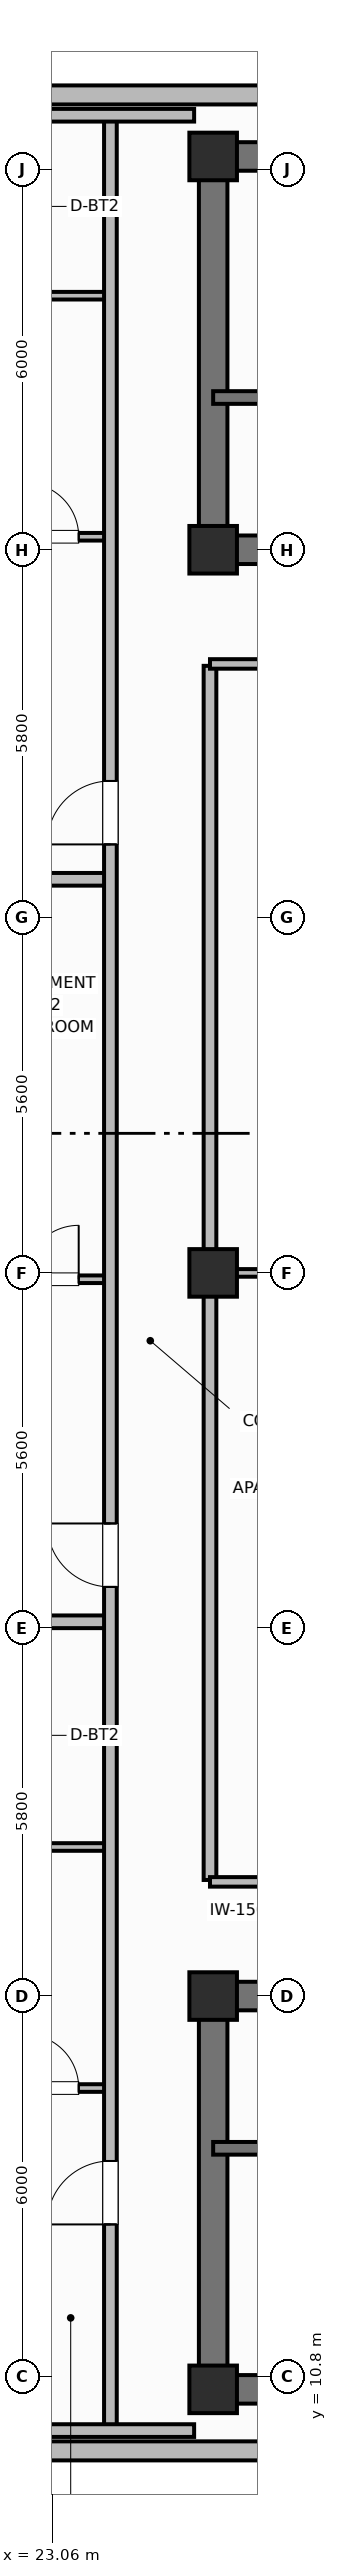
"""IFC4 building model, lengths in metres.
Left out: names, types, materials, properties, quantities, classifications, styles, units other than length and angle.
Written with IfcOpenShell. Run it as: python <this file> out.ifc"""

import sys

from ifc_helpers import new_model, si_unit, direction, frame, frame_2d, origin, origin_2d, place, context, subcontext, project, spatial, rectangle, extrude, element, fill, save


model = new_model("IFC4")
c1 = context("Model", 3, precision=1e-05, world=origin(), true_north=direction((0.0, 1.0)))
c2 = subcontext(c1, "Body", "Model", "MODEL_VIEW")
j1 = project(units=[si_unit("LENGTHUNIT", "METRE"), si_unit("PLANEANGLEUNIT", "RADIAN")], contexts=[c1])
p1 = place(None, origin())
s1 = spatial("IfcSite", under=j1, at=p1, CompositionType="ELEMENT")
p2 = place(p1, origin())
s2 = spatial("IfcBuilding", under=s1, at=p2, CompositionType="ELEMENT")
p3 = place(p2, frame((0.0, 0.0, 286.1)))
s3 = spatial("IfcBuildingStorey", under=s2, at=p3, CompositionType="ELEMENT", Elevation=286.1)
p4 = place(p3, frame((52.8, 10.6, 0.0), z_axis=(0.0, 0.0, 1.0), x_axis=(-1.0, 0.0, 0.0)))
e1 = element("IfcWall", 1, at=p4, inside=s3, PredefinedType="SHEAR", context=c2, shape_type="SweptSolid", body=[
    extrude(rectangle(XDim=27.2, YDim=0.45, at=frame_2d((13.6, 0.0))), origin(), (0.0, 0.0, 1.0), 3.7),
])
p5 = place(p3, frame((25.6, 10.825, 0.0), z_axis=(0.0, 0.0, 1.0), x_axis=(0.0, 1.0, 0.0)))
e2 = element("IfcWall", 2, at=p5, inside=s3, PredefinedType="SHEAR", context=c2, shape_type="SweptSolid", body=[
    extrude(rectangle(XDim=5.75, YDim=0.45, at=frame_2d((2.875, 0.0))), origin(), (0.0, 0.0, 1.0), 3.7),
])
p6 = place(p3, frame((25.6, 16.8, 0.0), z_axis=(0.0, 0.0, 1.0), x_axis=(1.0, 0.0, 0.0)))
e3 = element("IfcWall", 3, at=p6, inside=s3, PredefinedType="SHEAR", context=c2, shape_type="SweptSolid", body=[
    extrude(rectangle(XDim=27.2, YDim=0.45, at=frame_2d((13.6, 0.0))), origin(), (0.0, 0.0, 1.0), 3.7),
])
p7 = place(p6, frame((1.9, 0.0, 0.0)))
e4 = element("IfcOpeningElement", 4, at=p7, cuts=e3, PredefinedType="OPENING", context=c2, shape_type="SweptSolid", body=[
    extrude(rectangle(XDim=1.1, YDim=2.15, at=frame_2d((0.55, 1.075))), frame((0.0, 0.235, 0.0), z_axis=(0.0, -1.0, 0.0), x_axis=(1.0, 0.0, 0.0)), (0.0, 0.0, 1.0), 0.47),
])
p8 = place(p6, frame((13.0, 0.0, 0.0)))
e5 = element("IfcOpeningElement", 5, at=p8, cuts=e3, PredefinedType="OPENING", context=c2, shape_type="SweptSolid", body=[
    extrude(rectangle(XDim=1.2, YDim=2.15, at=frame_2d((0.6, 1.075))), frame((0.0, 0.235, 0.0), z_axis=(0.0, -1.0, 0.0), x_axis=(1.0, 0.0, 0.0)), (0.0, 0.0, 1.0), 0.47),
])
p9 = place(p6, frame((21.6, 0.0, 0.0)))
e6 = element("IfcOpeningElement", 6, at=p9, cuts=e3, PredefinedType="OPENING", context=c2, shape_type="SweptSolid", body=[
    extrude(rectangle(XDim=1.0, YDim=2.15, at=frame_2d((0.5, 1.075))), frame((0.0, 0.235, 0.0), z_axis=(0.0, -1.0, 0.0), x_axis=(1.0, 0.0, 0.0)), (0.0, 0.0, 1.0), 0.47),
])
p10 = place(p3, frame((25.6, 45.8, 0.0), z_axis=(0.0, 0.0, 1.0), x_axis=(1.0, 0.0, 0.0)))
e7 = element("IfcWall", 7, at=p10, inside=s3, PredefinedType="SHEAR", context=c2, shape_type="SweptSolid", body=[
    extrude(rectangle(XDim=27.2, YDim=0.45, at=frame_2d((13.6, 0.0))), origin(), (0.0, 0.0, 1.0), 3.7),
])
p11 = place(p3, frame((25.6, 39.825, 0.0), z_axis=(0.0, 0.0, 1.0), x_axis=(0.0, 1.0, 0.0)))
e8 = element("IfcWall", 8, at=p11, inside=s3, PredefinedType="SHEAR", context=c2, shape_type="SweptSolid", body=[
    extrude(rectangle(XDim=5.75, YDim=0.45, at=frame_2d((2.875, 0.0))), origin(), (0.0, 0.0, 1.0), 3.7),
])
p12 = place(p3, frame((52.8, 39.6, 0.0), z_axis=(0.0, 0.0, 1.0), x_axis=(-1.0, 0.0, 0.0)))
e9 = element("IfcWall", 9, at=p12, inside=s3, PredefinedType="SHEAR", context=c2, shape_type="SweptSolid", body=[
    extrude(rectangle(XDim=27.2, YDim=0.45, at=frame_2d((13.6, 0.0))), origin(), (0.0, 0.0, 1.0), 3.7),
])
p13 = place(p12, frame((24.2, 0.0, 0.0)))
e10 = element("IfcOpeningElement", 10, at=p13, cuts=e9, PredefinedType="OPENING", context=c2, shape_type="SweptSolid", body=[
    extrude(rectangle(XDim=1.1, YDim=2.15, at=frame_2d((0.55, 1.075))), frame((0.0, 0.235, 0.0), z_axis=(0.0, -1.0, 0.0), x_axis=(1.0, 0.0, 0.0)), (0.0, 0.0, 1.0), 0.47),
])
p14 = place(p12, frame((15.1, 0.0, 0.0)))
e11 = element("IfcOpeningElement", 11, at=p14, cuts=e9, PredefinedType="OPENING", context=c2, shape_type="SweptSolid", body=[
    extrude(rectangle(XDim=1.2, YDim=2.15, at=frame_2d((0.6, 1.075))), frame((0.0, 0.235, 0.0), z_axis=(0.0, -1.0, 0.0), x_axis=(1.0, 0.0, 0.0)), (0.0, 0.0, 1.0), 0.47),
])
p15 = place(p12, frame((11.6, 0.0, 0.0)))
e12 = element("IfcOpeningElement", 12, at=p15, cuts=e9, PredefinedType="OPENING", context=c2, shape_type="SweptSolid", body=[
    extrude(rectangle(XDim=0.9, YDim=2.1, at=frame_2d((0.45, 1.05))), frame((0.0, 0.235, 0.0), z_axis=(0.0, -1.0, 0.0), x_axis=(1.0, 0.0, 0.0)), (0.0, 0.0, 1.0), 0.47),
])
p16 = place(p12, frame((7.35, 0.0, 0.0)))
e13 = element("IfcOpeningElement", 13, at=p16, cuts=e9, PredefinedType="OPENING", context=c2, shape_type="SweptSolid", body=[
    extrude(rectangle(XDim=0.85, YDim=2.1, at=frame_2d((0.425, 1.05))), frame((0.0, 0.235, 0.0), z_axis=(0.0, -1.0, 0.0), x_axis=(1.0, 0.0, 0.0)), (0.0, 0.0, 1.0), 0.47),
])
p17 = place(p12, frame((4.2, 0.0, 0.0)))
e14 = element("IfcOpeningElement", 14, at=p17, cuts=e9, PredefinedType="OPENING", context=c2, shape_type="SweptSolid", body=[
    extrude(rectangle(XDim=1.3, YDim=2.2, at=frame_2d((0.65, 1.1))), frame((0.0, 0.235, 0.0), z_axis=(0.0, -1.0, 0.0), x_axis=(1.0, 0.0, 0.0)), (0.0, 0.0, 1.0), 0.47),
])
for number, where, z_axis, x_axis in (
    (15, (25.6, 10.6, 0.0), (0.0, 0.0, 1.0), (1.0, 0.0, 0.0)),
    (16, (25.6, 16.8, 0.0), (0.0, 0.0, 1.0), (1.0, 0.0, 0.0)),
    (17, (25.6, 39.6, 0.0), (0.0, 0.0, 1.0), (1.0, 0.0, 0.0)),
    (18, (25.6, 45.8, 0.0), (0.0, 0.0, 1.0), (1.0, 0.0, 0.0)),
    (19, (25.6, 28.2, 0.0), (0.0, 0.0, 1.0), (1.0, 0.0, 0.0)),
):
    element("IfcColumn", number, at=place(p3, frame(where, z_axis=z_axis, x_axis=x_axis)), inside=s3, PredefinedType="COLUMN", context=c2, shape_type="SweptSolid", body=[
        extrude(rectangle(XDim=0.75, YDim=0.75, at=origin_2d()), origin(), (0.0, 0.0, 1.0), 3.7),
    ])
p18 = place(p3, frame((22.56, 9.63, 0.0), z_axis=(0.0, 0.0, 1.0), x_axis=(1.0, 0.0, 0.0)))
e20 = element("IfcWall", 20, at=p18, inside=s3, PredefinedType="SOLIDWALL", context=c2, shape_type="SweptSolid", body=[
    extrude(rectangle(XDim=33.28, YDim=0.3, at=frame_2d((16.64, 0.0))), origin(), (0.0, 0.0, 1.0), 2.73),
])
p19 = place(p18, frame((4.747, 0.0, 0.76)))
e21 = element("IfcOpeningElement", 21, at=p19, cuts=e20, PredefinedType="OPENING", context=c2, shape_type="SweptSolid", body=[
    extrude(rectangle(XDim=1.4, YDim=1.85, at=frame_2d((0.7, 0.925))), frame((0.0, 0.16, 0.0), z_axis=(0.0, -1.0, 0.0), x_axis=(1.0, 0.0, 0.0)), (0.0, 0.0, 1.0), 0.32),
])
p20 = place(p18, frame((7.945, 0.0, 0.76)))
e22 = element("IfcOpeningElement", 22, at=p20, cuts=e20, PredefinedType="OPENING", context=c2, shape_type="SweptSolid", body=[
    extrude(rectangle(XDim=1.4, YDim=1.85, at=frame_2d((0.7, 0.925))), frame((0.0, 0.16, 0.0), z_axis=(0.0, -1.0, 0.0), x_axis=(1.0, 0.0, 0.0)), (0.0, 0.0, 1.0), 0.32),
])
p21 = place(p18, frame((14.341, 0.0, 0.76)))
e23 = element("IfcOpeningElement", 23, at=p21, cuts=e20, PredefinedType="OPENING", context=c2, shape_type="SweptSolid", body=[
    extrude(rectangle(XDim=1.4, YDim=1.85, at=frame_2d((0.7, 0.925))), frame((0.0, 0.16, 0.0), z_axis=(0.0, -1.0, 0.0), x_axis=(1.0, 0.0, 0.0)), (0.0, 0.0, 1.0), 0.32),
])
p22 = place(p18, frame((17.539, 0.0, 0.76)))
e24 = element("IfcOpeningElement", 24, at=p22, cuts=e20, PredefinedType="OPENING", context=c2, shape_type="SweptSolid", body=[
    extrude(rectangle(XDim=1.4, YDim=1.85, at=frame_2d((0.7, 0.925))), frame((0.0, 0.16, 0.0), z_axis=(0.0, -1.0, 0.0), x_axis=(1.0, 0.0, 0.0)), (0.0, 0.0, 1.0), 0.32),
])
p23 = place(p18, frame((23.935, 0.0, 0.76)))
e25 = element("IfcOpeningElement", 25, at=p23, cuts=e20, PredefinedType="OPENING", context=c2, shape_type="SweptSolid", body=[
    extrude(rectangle(XDim=1.4, YDim=1.85, at=frame_2d((0.7, 0.925))), frame((0.0, 0.16, 0.0), z_axis=(0.0, -1.0, 0.0), x_axis=(1.0, 0.0, 0.0)), (0.0, 0.0, 1.0), 0.32),
])
p24 = place(p18, frame((27.133, 0.0, 0.76)))
e26 = element("IfcOpeningElement", 26, at=p24, cuts=e20, PredefinedType="OPENING", context=c2, shape_type="SweptSolid", body=[
    extrude(rectangle(XDim=1.4, YDim=1.85, at=frame_2d((0.7, 0.925))), frame((0.0, 0.16, 0.0), z_axis=(0.0, -1.0, 0.0), x_axis=(1.0, 0.0, 0.0)), (0.0, 0.0, 1.0), 0.32),
])
p25 = place(p3, frame((55.84, 46.77, 0.0), z_axis=(0.0, 0.0, 1.0), x_axis=(-1.0, 0.0, 0.0)))
e27 = element("IfcWall", 27, at=p25, inside=s3, PredefinedType="SOLIDWALL", context=c2, shape_type="SweptSolid", body=[
    extrude(rectangle(XDim=33.28, YDim=0.3, at=frame_2d((16.64, 0.0))), origin(), (0.0, 0.0, 1.0), 2.73),
])
p26 = place(p25, frame((5.08, 0.0, 0.76)))
e28 = element("IfcOpeningElement", 28, at=p26, cuts=e27, PredefinedType="OPENING", context=c2, shape_type="SweptSolid", body=[
    extrude(rectangle(XDim=1.8, YDim=1.85, at=frame_2d((0.9, 0.925))), frame((0.0, 0.16, 0.0), z_axis=(0.0, -1.0, 0.0), x_axis=(1.0, 0.0, 0.0)), (0.0, 0.0, 1.0), 0.32),
])
p27 = place(p25, frame((8.633, 0.0, 0.76)))
e29 = element("IfcOpeningElement", 29, at=p27, cuts=e27, PredefinedType="OPENING", context=c2, shape_type="SweptSolid", body=[
    extrude(rectangle(XDim=1.8, YDim=1.85, at=frame_2d((0.9, 0.925))), frame((0.0, 0.16, 0.0), z_axis=(0.0, -1.0, 0.0), x_axis=(1.0, 0.0, 0.0)), (0.0, 0.0, 1.0), 0.32),
])
p28 = place(p25, frame((15.74, 0.0, 0.76)))
e30 = element("IfcOpeningElement", 30, at=p28, cuts=e27, PredefinedType="OPENING", context=c2, shape_type="SweptSolid", body=[
    extrude(rectangle(XDim=1.8, YDim=1.85, at=frame_2d((0.9, 0.925))), frame((0.0, 0.16, 0.0), z_axis=(0.0, -1.0, 0.0), x_axis=(1.0, 0.0, 0.0)), (0.0, 0.0, 1.0), 0.32),
])
p29 = place(p25, frame((22.847, 0.0, 0.76)))
e31 = element("IfcOpeningElement", 31, at=p29, cuts=e27, PredefinedType="OPENING", context=c2, shape_type="SweptSolid", body=[
    extrude(rectangle(XDim=1.8, YDim=1.85, at=frame_2d((0.9, 0.925))), frame((0.0, 0.16, 0.0), z_axis=(0.0, -1.0, 0.0), x_axis=(1.0, 0.0, 0.0)), (0.0, 0.0, 1.0), 0.32),
])
p30 = place(p25, frame((26.4, 0.0, 0.76)))
e32 = element("IfcOpeningElement", 32, at=p30, cuts=e27, PredefinedType="OPENING", context=c2, shape_type="SweptSolid", body=[
    extrude(rectangle(XDim=1.8, YDim=1.85, at=frame_2d((0.9, 0.925))), frame((0.0, 0.16, 0.0), z_axis=(0.0, -1.0, 0.0), x_axis=(1.0, 0.0, 0.0)), (0.0, 0.0, 1.0), 0.32),
])
p31 = place(p3, frame((25.6, 14.4, 0.0), z_axis=(0.0, 0.0, 1.0), x_axis=(1.0, 0.0, 0.0)))
e33 = element("IfcWall", 33, at=p31, inside=s3, PredefinedType="SHEAR", context=c2, shape_type="SweptSolid", body=[
    extrude(rectangle(XDim=9.55, YDim=0.2, at=frame_2d((4.775, 0.0))), origin(), (0.0, 0.0, 1.0), 3.7),
])
p32 = place(p31, frame((1.05, 0.0, 0.0)))
e34 = element("IfcOpeningElement", 34, at=p32, cuts=e33, PredefinedType="OPENING", context=c2, shape_type="SweptSolid", body=[
    extrude(rectangle(XDim=1.1, YDim=2.15, at=frame_2d((0.55, 1.075))), frame((0.0, 0.11, 0.0), z_axis=(0.0, -1.0, 0.0), x_axis=(1.0, 0.0, 0.0)), (0.0, 0.0, 1.0), 0.22),
])
p33 = place(p3, frame((35.15, 42.0, 0.0), z_axis=(0.0, 0.0, 1.0), x_axis=(-1.0, 0.0, 0.0)))
e35 = element("IfcWall", 35, at=p33, inside=s3, PredefinedType="SHEAR", context=c2, shape_type="SweptSolid", body=[
    extrude(rectangle(XDim=9.55, YDim=0.2, at=frame_2d((4.775, 0.0))), origin(), (0.0, 0.0, 1.0), 3.7),
])
p34 = place(p33, frame((7.25, 0.0, 0.0)))
e36 = element("IfcOpeningElement", 36, at=p34, cuts=e35, PredefinedType="OPENING", context=c2, shape_type="SweptSolid", body=[
    extrude(rectangle(XDim=1.1, YDim=2.15, at=frame_2d((0.55, 1.075))), frame((0.0, 0.11, 0.0), z_axis=(0.0, -1.0, 0.0), x_axis=(1.0, 0.0, 0.0)), (0.0, 0.0, 1.0), 0.22),
])
p35 = place(p3, frame((25.55, 18.63, 0.0), z_axis=(0.0, 0.0, 1.0), x_axis=(0.0, 1.0, 0.0)))
e37 = element("IfcWall", 37, at=p35, inside=s3, PredefinedType="PARTITIONING", context=c2, shape_type="SweptSolid", body=[
    extrude(rectangle(XDim=19.14, YDim=0.2, at=frame_2d((9.57, 0.0))), origin(), (0.0, 0.0, 1.0), 2.56),
])
for number, where, z_axis, x_axis in (
    (38, (25.55, 18.6, 0.0), (0.0, 0.0, 1.0), (1.0, 0.0, 0.0)),
    (39, (25.55, 37.8, 0.0), (0.0, 0.0, 1.0), (1.0, 0.0, 0.0)),
):
    element("IfcWall", number, at=place(p3, frame(where, z_axis=z_axis, x_axis=x_axis)), inside=s3, PredefinedType="PARTITIONING", context=c2, shape_type="SweptSolid", body=[
        extrude(rectangle(XDim=2.7, YDim=0.15, at=frame_2d((1.35, 0.0))), origin(), (0.0, 0.0, 1.0), 2.56),
    ])
p36 = place(p3, frame((25.6, 28.2, 0.0), z_axis=(0.0, 0.0, 1.0), x_axis=(1.0, 0.0, 0.0)))
e40 = element("IfcWall", 40, at=p36, inside=s3, PredefinedType="PARTITIONING", context=c2, shape_type="SweptSolid", body=[
    extrude(rectangle(XDim=2.66, YDim=0.12, at=frame_2d((1.33, 0.0))), origin(), (0.0, 0.0, 1.0), 2.56),
])
p37 = place(p3, frame((22.03, 15.35, 0.0), z_axis=(0.0, 0.0, 1.0), x_axis=(1.0, 0.0, 0.0)))
e41 = element("IfcWall", 41, at=p37, inside=s3, PredefinedType="PARTITIONING", context=c2, shape_type="SweptSolid", body=[
    extrude(rectangle(XDim=1.95, YDim=0.12, at=frame_2d((0.975, 0.0))), origin(), (0.0, 0.0, 1.0), 2.56),
])
p38 = place(p37, frame((0.6, 0.0, 0.0)))
e42 = element("IfcOpeningElement", 42, at=p38, cuts=e41, PredefinedType="OPENING", context=c2, shape_type="SweptSolid", body=[
    extrude(rectangle(XDim=0.85, YDim=2.1, at=frame_2d((0.425, 1.05))), frame((0.0, 0.07, 0.0), z_axis=(0.0, -1.0, 0.0), x_axis=(1.0, 0.0, 0.0)), (0.0, 0.0, 1.0), 0.14),
])
p39 = place(p3, frame((22.03, 19.15, 0.0), z_axis=(0.0, 0.0, 1.0), x_axis=(1.0, 0.0, 0.0)))
e43 = element("IfcWall", 43, at=p39, inside=s3, PredefinedType="PARTITIONING", context=c2, shape_type="SweptSolid", body=[
    extrude(rectangle(XDim=1.95, YDim=0.12, at=frame_2d((0.975, 0.0))), origin(), (0.0, 0.0, 1.0), 2.56),
])
p40 = place(p3, frame((19.53, 22.7, 0.0), z_axis=(0.0, 0.0, 1.0), x_axis=(1.0, 0.0, 0.0)))
e44 = element("IfcWall", 44, at=p40, inside=s3, PredefinedType="PARTITIONING", context=c2, shape_type="SweptSolid", body=[
    extrude(rectangle(XDim=4.45, YDim=0.2, at=frame_2d((2.225, 0.0))), origin(), (0.0, 0.0, 1.0), 2.56),
])
p41 = place(p3, frame((22.03, 28.1, 0.0), z_axis=(0.0, 0.0, 1.0), x_axis=(1.0, 0.0, 0.0)))
e45 = element("IfcWall", 45, at=p41, inside=s3, PredefinedType="PARTITIONING", context=c2, shape_type="SweptSolid", body=[
    extrude(rectangle(XDim=1.95, YDim=0.12, at=frame_2d((0.975, 0.0))), origin(), (0.0, 0.0, 1.0), 2.56),
])
p42 = place(p41, frame((0.6, 0.0, 0.0)))
e46 = element("IfcOpeningElement", 46, at=p42, cuts=e45, PredefinedType="OPENING", context=c2, shape_type="SweptSolid", body=[
    extrude(rectangle(XDim=0.85, YDim=2.1, at=frame_2d((0.425, 1.05))), frame((0.0, 0.07, 0.0), z_axis=(0.0, -1.0, 0.0), x_axis=(1.0, 0.0, 0.0)), (0.0, 0.0, 1.0), 0.14),
])
p43 = place(p3, frame((19.53, 34.405, 0.0), z_axis=(0.0, 0.0, 1.0), x_axis=(1.0, 0.0, 0.0)))
e47 = element("IfcWall", 47, at=p43, inside=s3, PredefinedType="PARTITIONING", context=c2, shape_type="SweptSolid", body=[
    extrude(rectangle(XDim=4.45, YDim=0.2, at=frame_2d((2.225, 0.0))), origin(), (0.0, 0.0, 1.0), 2.56),
])
p44 = place(p3, frame((22.03, 39.805, 0.0), z_axis=(0.0, 0.0, 1.0), x_axis=(1.0, 0.0, 0.0)))
e48 = element("IfcWall", 48, at=p44, inside=s3, PredefinedType="PARTITIONING", context=c2, shape_type="SweptSolid", body=[
    extrude(rectangle(XDim=1.95, YDim=0.12, at=frame_2d((0.975, 0.0))), origin(), (0.0, 0.0, 1.0), 2.56),
])
p45 = place(p44, frame((0.6, 0.0, 0.0)))
e49 = element("IfcOpeningElement", 49, at=p45, cuts=e48, PredefinedType="OPENING", context=c2, shape_type="SweptSolid", body=[
    extrude(rectangle(XDim=0.85, YDim=2.1, at=frame_2d((0.425, 1.05))), frame((0.0, 0.07, 0.0), z_axis=(0.0, -1.0, 0.0), x_axis=(1.0, 0.0, 0.0)), (0.0, 0.0, 1.0), 0.14),
])
p46 = place(p3, frame((22.03, 43.605, 0.0), z_axis=(0.0, 0.0, 1.0), x_axis=(1.0, 0.0, 0.0)))
e50 = element("IfcWall", 50, at=p46, inside=s3, PredefinedType="PARTITIONING", context=c2, shape_type="SweptSolid", body=[
    extrude(rectangle(XDim=1.95, YDim=0.12, at=frame_2d((0.975, 0.0))), origin(), (0.0, 0.0, 1.0), 2.56),
])
p47 = place(p3, frame((23.98, 9.95, 0.0), z_axis=(0.0, 0.0, 1.0), x_axis=(0.0, 1.0, 0.0)))
e51 = element("IfcWall", 51, at=p47, inside=s3, PredefinedType="PARTITIONING", context=c2, shape_type="SweptSolid", body=[
    extrude(rectangle(XDim=36.5, YDim=0.2, at=frame_2d((18.25, 0.0))), origin(), (0.0, 0.0, 1.0), 2.56),
])
p48 = place(p47, frame((3.25, 0.0, 0.0)))
e52 = element("IfcOpeningElement", 52, at=p48, cuts=e51, PredefinedType="OPENING", context=c2, shape_type="SweptSolid", body=[
    extrude(rectangle(XDim=1.0, YDim=2.15, at=frame_2d((0.5, 1.075))), frame((0.0, 0.11, 0.0), z_axis=(0.0, -1.0, 0.0), x_axis=(1.0, 0.0, 0.0)), (0.0, 0.0, 1.0), 0.22),
])
p49 = place(p47, frame((13.3, 0.0, 0.0)))
e53 = element("IfcOpeningElement", 53, at=p49, cuts=e51, PredefinedType="OPENING", context=c2, shape_type="SweptSolid", body=[
    extrude(rectangle(XDim=1.0, YDim=2.15, at=frame_2d((0.5, 1.075))), frame((0.0, 0.11, 0.0), z_axis=(0.0, -1.0, 0.0), x_axis=(1.0, 0.0, 0.0)), (0.0, 0.0, 1.0), 0.22),
])
p50 = place(p47, frame((25.005, 0.0, 0.0)))
e54 = element("IfcOpeningElement", 54, at=p50, cuts=e51, PredefinedType="OPENING", context=c2, shape_type="SweptSolid", body=[
    extrude(rectangle(XDim=1.0, YDim=2.15, at=frame_2d((0.5, 1.075))), frame((0.0, 0.11, 0.0), z_axis=(0.0, -1.0, 0.0), x_axis=(1.0, 0.0, 0.0)), (0.0, 0.0, 1.0), 0.22),
])
for number, where, z_axis, x_axis in (
    (55, (21.546, 9.95, 0.0), (0.0, 0.0, 1.0), (1.0, 0.0, 0.0)),
    (56, (21.546, 46.45, 0.0), (0.0, 0.0, 1.0), (1.0, 0.0, 0.0)),
):
    element("IfcWall", number, at=place(p3, frame(where, z_axis=z_axis, x_axis=x_axis)), inside=s3, PredefinedType="PARTITIONING", context=c2, shape_type="SweptSolid", body=[
        extrude(rectangle(XDim=3.754, YDim=0.2, at=frame_2d((1.877, 0.0))), origin(), (0.0, 0.0, 1.0), 2.56),
    ])
p51 = place(p38, origin())
e57 = element("IfcDoor", 57, at=p51, inside=s3, OperationType="SINGLE_SWING_LEFT", PredefinedType="DOOR", context=c2, shape_type="SweptSolid", body=[
    extrude(rectangle(XDim=0.85, YDim=2.1, at=frame_2d((0.425, 1.05))), frame((0.0, 0.025, 0.0), z_axis=(0.0, -1.0, 0.0), x_axis=(1.0, 0.0, 0.0)), (0.0, 0.0, 1.0), 0.05),
])
fill(e42, e57)
p52 = place(p42, origin())
e58 = element("IfcDoor", 58, at=p52, inside=s3, OperationType="SINGLE_SWING_RIGHT", PredefinedType="DOOR", context=c2, shape_type="SweptSolid", body=[
    extrude(rectangle(XDim=0.85, YDim=2.1, at=frame_2d((0.425, 1.05))), frame((0.0, 0.025, 0.0), z_axis=(0.0, -1.0, 0.0), x_axis=(1.0, 0.0, 0.0)), (0.0, 0.0, 1.0), 0.05),
])
fill(e46, e58)
p53 = place(p45, origin())
e59 = element("IfcDoor", 59, at=p53, inside=s3, OperationType="SINGLE_SWING_LEFT", PredefinedType="DOOR", context=c2, shape_type="SweptSolid", body=[
    extrude(rectangle(XDim=0.85, YDim=2.1, at=frame_2d((0.425, 1.05))), frame((0.0, 0.025, 0.0), z_axis=(0.0, -1.0, 0.0), x_axis=(1.0, 0.0, 0.0)), (0.0, 0.0, 1.0), 0.05),
])
fill(e49, e59)
p54 = place(p48, origin())
e60 = element("IfcDoor", 60, at=p54, inside=s3, OperationType="SINGLE_SWING_LEFT", PredefinedType="DOOR", context=c2, shape_type="SweptSolid", body=[
    extrude(rectangle(XDim=1.0, YDim=2.15, at=frame_2d((0.5, 1.075))), frame((0.0, 0.025, 0.0), z_axis=(0.0, -1.0, 0.0), x_axis=(1.0, 0.0, 0.0)), (0.0, 0.0, 1.0), 0.05),
])
fill(e52, e60)
p55 = place(p49, origin())
e61 = element("IfcDoor", 61, at=p55, inside=s3, OperationType="SINGLE_SWING_RIGHT", PredefinedType="DOOR", context=c2, shape_type="SweptSolid", body=[
    extrude(rectangle(XDim=1.0, YDim=2.15, at=frame_2d((0.5, 1.075))), frame((0.0, 0.025, 0.0), z_axis=(0.0, -1.0, 0.0), x_axis=(1.0, 0.0, 0.0)), (0.0, 0.0, 1.0), 0.05),
])
fill(e53, e61)
p56 = place(p50, origin())
e62 = element("IfcDoor", 62, at=p56, inside=s3, OperationType="SINGLE_SWING_LEFT", PredefinedType="DOOR", context=c2, shape_type="SweptSolid", body=[
    extrude(rectangle(XDim=1.0, YDim=2.15, at=frame_2d((0.5, 1.075))), frame((0.0, 0.025, 0.0), z_axis=(0.0, -1.0, 0.0), x_axis=(1.0, 0.0, 0.0)), (0.0, 0.0, 1.0), 0.05),
])
fill(e54, e62)
save(model, sys.argv[1])
